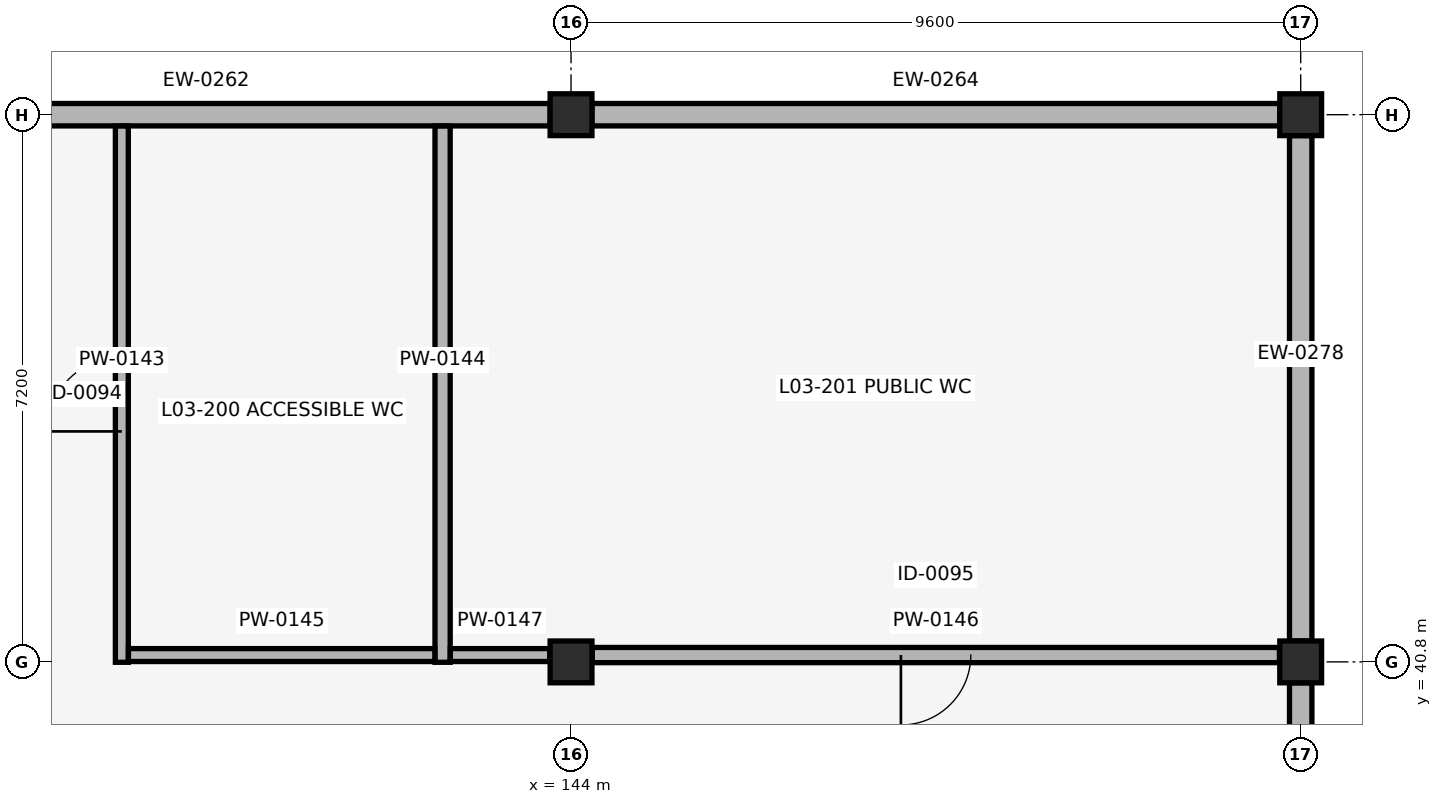
"""IFC4 building model, lengths in metres.
Left out: names, types, materials, properties, quantities, classifications, styles, units other than length and angle.
Written with IfcOpenShell. Run it as: python <this file> out.ifc"""

import sys

from ifc_helpers import new_model, si_unit, direction, frame, frame_2d, origin, origin_2d, place, context, subcontext, project, spatial, rectangle, extrude, element, fill, save


model = new_model("IFC4")
c1 = context("Model", 3, precision=1e-05, world=origin(), true_north=direction((0.0, 1.0)))
c2 = subcontext(c1, "Body", "Model", "MODEL_VIEW")
j1 = project(units=[si_unit("LENGTHUNIT", "METRE"), si_unit("PLANEANGLEUNIT", "RADIAN")], contexts=[c1])
p1 = place(None, origin())
s1 = spatial("IfcSite", under=j1, at=p1, CompositionType="ELEMENT")
p2 = place(p1, origin())
s2 = spatial("IfcBuilding", under=s1, at=p2, CompositionType="ELEMENT")
p3 = place(p2, frame((0.0, 0.0, 12.58)))
s3 = spatial("IfcBuildingStorey", under=s2, at=p3, CompositionType="ELEMENT", Elevation=12.58)
for number, where, z_axis, x_axis in (
    (1, (144.0, 40.8, 0.0), (0.0, 0.0, 1.0), (1.0, 0.0, 0.0)),
    (2, (144.0, 48.0, 0.0), (0.0, 0.0, 1.0), (1.0, 0.0, 0.0)),
    (3, (153.6, 40.8, 0.0), (0.0, 0.0, 1.0), (1.0, 0.0, 0.0)),
    (4, (153.6, 48.0, 0.0), (0.0, 0.0, 1.0), (1.0, 0.0, 0.0)),
):
    element("IfcColumn", number, at=place(p3, frame(where, z_axis=z_axis, x_axis=x_axis)), inside=s3, PredefinedType="COLUMN", context=c2, shape_type="SweptSolid", body=[
        extrude(rectangle(XDim=0.55, YDim=0.55, at=origin_2d()), origin(), (0.0, 0.0, 1.0), 4.08),
    ])
for number, where, z_axis, x_axis in (
    (5, (143.725, 48.0, 0.0), (0.0, 0.0, 1.0), (-1.0, 0.0, 0.0)),
    (6, (153.325, 48.0, 0.0), (0.0, 0.0, 1.0), (-1.0, 0.0, 0.0)),
):
    element("IfcWall", number, at=place(p3, frame(where, z_axis=z_axis, x_axis=x_axis)), inside=s3, PredefinedType="SOLIDWALL", context=c2, shape_type="SweptSolid", body=[
        extrude(rectangle(XDim=9.05, YDim=0.295, at=frame_2d((4.525, 0.0))), origin(), (0.0, 0.0, 1.0), 3.06),
    ])
p4 = place(p3, frame((153.6, 33.875, 0.0), z_axis=(0.0, 0.0, 1.0), x_axis=(0.0, 1.0, 0.0)))
e7 = element("IfcWall", 7, at=p4, inside=s3, PredefinedType="SOLIDWALL", context=c2, shape_type="SweptSolid", body=[
    extrude(rectangle(XDim=6.65, YDim=0.295, at=frame_2d((3.325, 0.0))), origin(), (0.0, 0.0, 1.0), 3.06),
])
p5 = place(p3, frame((153.6, 41.075, 0.0), z_axis=(0.0, 0.0, 1.0), x_axis=(0.0, 1.0, 0.0)))
e8 = element("IfcWall", 8, at=p5, inside=s3, PredefinedType="SOLIDWALL", context=c2, shape_type="SweptSolid", body=[
    extrude(rectangle(XDim=6.65, YDim=0.295, at=frame_2d((3.325, 0.0))), origin(), (0.0, 0.0, 1.0), 3.06),
])
p6 = place(p3, frame((138.09, 40.795, 0.0), z_axis=(0.0, 0.0, 1.0), x_axis=(0.0, 1.0, 0.0)))
e9 = element("IfcWall", 9, at=p6, inside=s3, PredefinedType="PLUMBINGWALL", context=c2, shape_type="SweptSolid", body=[
    extrude(rectangle(XDim=7.056, YDim=0.17, at=frame_2d((3.528, 0.0))), origin(), (0.0, 0.0, 1.0), 3.11),
])
p7 = place(p6, frame((3.038, 0.0, 0.0)))
e10 = element("IfcOpeningElement", 10, at=p7, cuts=e9, PredefinedType="OPENING", context=c2, shape_type="SweptSolid", body=[
    extrude(rectangle(XDim=0.98, YDim=2.08, at=frame_2d((0.49, 1.04))), frame((0.0, 0.095, 0.0), z_axis=(0.0, -1.0, 0.0), x_axis=(1.0, 0.0, 0.0)), (0.0, 0.0, 1.0), 0.19),
])
p8 = place(p3, frame((142.31, 40.795, 0.0), z_axis=(0.0, 0.0, 1.0), x_axis=(0.0, 1.0, 0.0)))
e11 = element("IfcWall", 11, at=p8, inside=s3, PredefinedType="PLUMBINGWALL", context=c2, shape_type="SweptSolid", body=[
    extrude(rectangle(XDim=7.056, YDim=0.2, at=frame_2d((3.528, 0.0))), origin(), (0.0, 0.0, 1.0), 3.11),
])
p9 = place(p3, frame((138.177, 40.89, 0.0), z_axis=(0.0, 0.0, 1.0), x_axis=(1.0, 0.0, 0.0)))
e12 = element("IfcWall", 12, at=p9, inside=s3, PredefinedType="PLUMBINGWALL", context=c2, shape_type="SweptSolid", body=[
    extrude(rectangle(XDim=4.031, YDim=0.17, at=frame_2d((2.016, 0.0))), origin(), (0.0, 0.0, 1.0), 3.12),
])
p10 = place(p3, frame((144.28, 40.89, 0.0), z_axis=(0.0, 0.0, 1.0), x_axis=(1.0, 0.0, 0.0)))
e13 = element("IfcWall", 13, at=p10, inside=s3, PredefinedType="PLUMBINGWALL", context=c2, shape_type="SweptSolid", body=[
    extrude(rectangle(XDim=9.04, YDim=0.2, at=frame_2d((4.52, 0.0))), origin(), (0.0, 0.0, 1.0), 3.12),
])
p11 = place(p10, frame((4.06, 0.0, 0.0)))
e14 = element("IfcOpeningElement", 14, at=p11, cuts=e13, PredefinedType="OPENING", context=c2, shape_type="SweptSolid", body=[
    extrude(rectangle(XDim=0.92, YDim=2.08, at=frame_2d((0.46, 1.04))), frame((0.0, 0.11, 0.0), z_axis=(0.0, -1.0, 0.0), x_axis=(1.0, 0.0, 0.0)), (0.0, 0.0, 1.0), 0.22),
])
p12 = place(p3, frame((142.412, 40.89, 0.0), z_axis=(0.0, 0.0, 1.0), x_axis=(1.0, 0.0, 0.0)))
e15 = element("IfcWall", 15, at=p12, inside=s3, PredefinedType="PLUMBINGWALL", context=c2, shape_type="SweptSolid", body=[
    extrude(rectangle(XDim=1.308, YDim=0.17, at=frame_2d((0.654, 0.0))), origin(), (0.0, 0.0, 1.0), 3.12),
])
p13 = place(p7, origin())
e16 = element("IfcDoor", 16, at=p13, inside=s3, OperationType="SINGLE_SWING_LEFT", PredefinedType="DOOR", context=c2, shape_type="SweptSolid", body=[
    extrude(rectangle(XDim=0.98, YDim=2.08, at=frame_2d((0.49, 1.04))), frame((0.0, 0.025, 0.0), z_axis=(0.0, -1.0, 0.0), x_axis=(1.0, 0.0, 0.0)), (0.0, 0.0, 1.0), 0.05),
])
fill(e10, e16)
p14 = place(p11, origin())
e17 = element("IfcDoor", 17, at=p14, inside=s3, OperationType="SINGLE_SWING_RIGHT", PredefinedType="DOOR", context=c2, shape_type="SweptSolid", body=[
    extrude(rectangle(XDim=0.92, YDim=2.08, at=frame_2d((0.46, 1.04))), frame((0.0, 0.025, 0.0), z_axis=(0.0, -1.0, 0.0), x_axis=(1.0, 0.0, 0.0)), (0.0, 0.0, 1.0), 0.05),
])
fill(e14, e17)
save(model, sys.argv[1])
